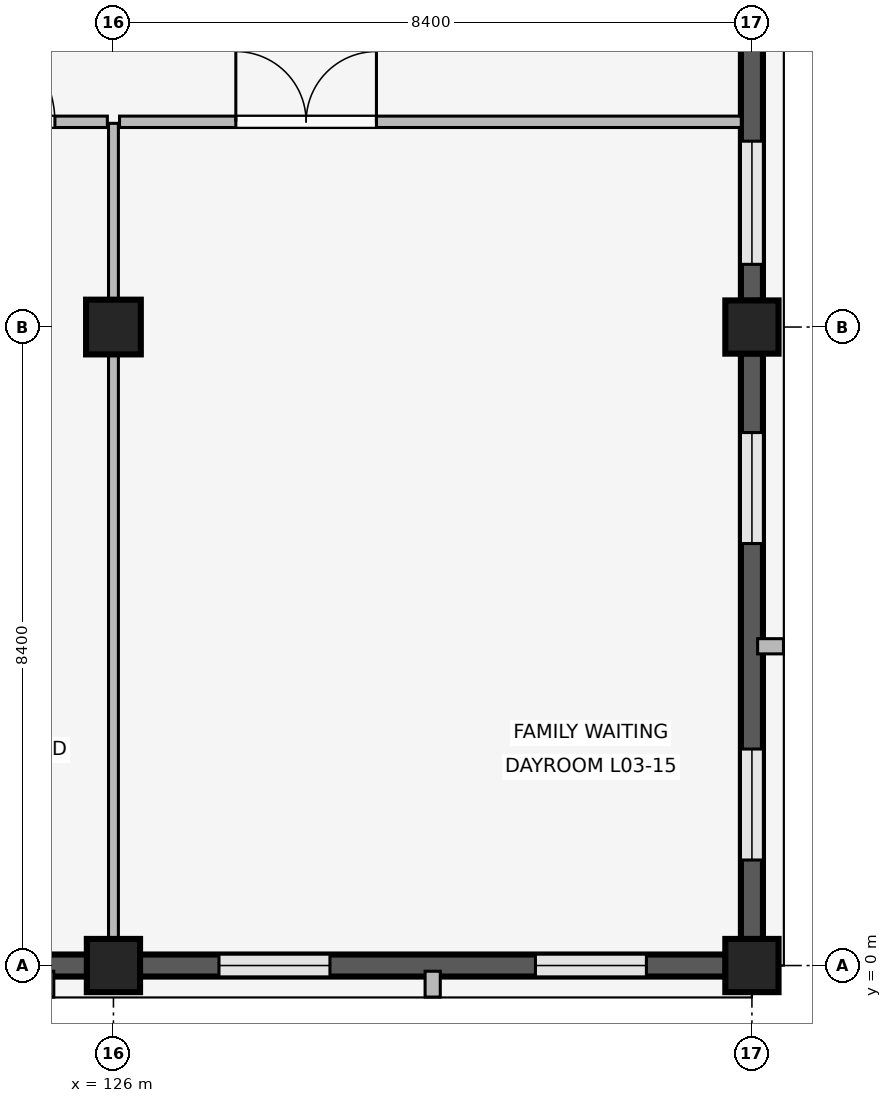
"""IFC4 building model, lengths in metres.
Left out: names, types, materials, properties, quantities, classifications, styles, units other than length and angle.
Written with IfcOpenShell. Run it as: python <this file> out.ifc"""

import sys

from ifc_helpers import new_model, si_unit, direction, frame, frame_2d, origin, origin_2d, place, context, subcontext, project, spatial, rectangle, extrude, element, fill, save


model = new_model("IFC4")
c1 = context("Model", 3, precision=1e-05, world=origin(), true_north=direction((0.0, 1.0)))
c2 = subcontext(c1, "Body", "Model", "MODEL_VIEW")
j1 = project(units=[si_unit("LENGTHUNIT", "METRE"), si_unit("PLANEANGLEUNIT", "RADIAN")], contexts=[c1])
p1 = place(None, origin())
s1 = spatial("IfcSite", under=j1, at=p1, CompositionType="ELEMENT")
p2 = place(p1, origin())
s2 = spatial("IfcBuilding", under=s1, at=p2, CompositionType="ELEMENT")
p3 = place(p2, frame((0.0, 0.0, 12.9)))
s3 = spatial("IfcBuildingStorey", under=s2, at=p3, CompositionType="ELEMENT", Elevation=12.9)
p4 = place(p3, frame((126.0, 0.0, 0.0), z_axis=(0.0, 0.0, 1.0), x_axis=(1.0, 0.0, 0.0)))
e1 = element("IfcColumn", 1, at=p4, inside=s3, PredefinedType="COLUMN", context=c2, shape_type="SweptSolid", body=[
    extrude(rectangle(XDim=0.7, YDim=0.7, at=origin_2d()), origin(), (0.0, 0.0, 1.0), 3.3),
])
p5 = place(p3, frame((126.0, 8.4, 0.0), z_axis=(0.0, 0.0, 1.0), x_axis=(1.0, 0.0, 0.0)))
e2 = element("IfcColumn", 2, at=p5, inside=s3, PredefinedType="COLUMN", context=c2, shape_type="SweptSolid", body=[
    extrude(rectangle(XDim=0.72, YDim=0.72, at=origin_2d()), origin(), (0.0, 0.0, 1.0), 3.3),
])
for number, where, z_axis, x_axis in (
    (3, (134.4, 0.0, 0.0), (0.0, 0.0, 1.0), (1.0, 0.0, 0.0)),
    (4, (134.4, 8.4, 0.0), (0.0, 0.0, 1.0), (1.0, 0.0, 0.0)),
):
    element("IfcColumn", number, at=place(p3, frame(where, z_axis=z_axis, x_axis=x_axis)), inside=s3, PredefinedType="COLUMN", context=c2, shape_type="SweptSolid", body=[
        extrude(rectangle(XDim=0.7, YDim=0.7, at=origin_2d()), origin(), (0.0, 0.0, 1.0), 3.3),
    ])
p6 = place(p3, frame((125.655, 0.0, 0.0), z_axis=(0.0, 0.0, 1.0), x_axis=(-1.0, 0.0, 0.0)))
e5 = element("IfcWall", 5, at=p6, inside=s3, PredefinedType="SOLIDWALL", context=c2, shape_type="SweptSolid", body=[
    extrude(rectangle(XDim=7.71, YDim=0.29, at=frame_2d((3.855, 0.0))), origin(), (0.0, 0.0, 1.0), 2.44),
])
p7 = place(p6, frame((0.963, 0.0, 0.85)))
e6 = element("IfcOpeningElement", 6, at=p7, cuts=e5, PredefinedType="OPENING", context=c2, shape_type="SweptSolid", body=[
    extrude(rectangle(XDim=1.62, YDim=0.95, at=frame_2d((0.81, 0.475))), frame((0.0, 0.155, 0.0), z_axis=(0.0, -1.0, 0.0), x_axis=(1.0, 0.0, 0.0)), (0.0, 0.0, 1.0), 0.31),
])
p8 = place(p6, frame((5.127, 0.0, 0.85)))
e7 = element("IfcOpeningElement", 7, at=p8, cuts=e5, PredefinedType="OPENING", context=c2, shape_type="SweptSolid", body=[
    extrude(rectangle(XDim=1.62, YDim=0.95, at=frame_2d((0.81, 0.475))), frame((0.0, 0.155, 0.0), z_axis=(0.0, -1.0, 0.0), x_axis=(1.0, 0.0, 0.0)), (0.0, 0.0, 1.0), 0.31),
])
p9 = place(p3, frame((125.115, -0.075, 0.0), z_axis=(0.0, 0.0, 1.0), x_axis=(0.0, -1.0, 0.0)))
e8 = element("IfcWall", 8, at=p9, inside=s3, PredefinedType="ELEMENTEDWALL", context=c2, shape_type="SweptSolid", body=[
    extrude(rectangle(XDim=0.34, YDim=0.2, at=frame_2d((0.17, 0.0))), origin(), (0.0, 0.0, 1.0), 2.42),
])
p10 = place(p3, frame((134.055, 0.0, 0.0), z_axis=(0.0, 0.0, 1.0), x_axis=(-1.0, 0.0, 0.0)))
e9 = element("IfcWall", 9, at=p10, inside=s3, PredefinedType="SOLIDWALL", context=c2, shape_type="SweptSolid", body=[
    extrude(rectangle(XDim=7.71, YDim=0.29, at=frame_2d((3.855, 0.0))), origin(), (0.0, 0.0, 1.0), 2.44),
])
p11 = place(p10, frame((1.043, 0.0, 0.85)))
e10 = element("IfcOpeningElement", 10, at=p11, cuts=e9, PredefinedType="OPENING", context=c2, shape_type="SweptSolid", body=[
    extrude(rectangle(XDim=1.46, YDim=0.85, at=frame_2d((0.73, 0.425))), frame((0.0, 0.155, 0.0), z_axis=(0.0, -1.0, 0.0), x_axis=(1.0, 0.0, 0.0)), (0.0, 0.0, 1.0), 0.31),
])
p12 = place(p10, frame((5.207, 0.0, 0.85)))
e11 = element("IfcOpeningElement", 11, at=p12, cuts=e9, PredefinedType="OPENING", context=c2, shape_type="SweptSolid", body=[
    extrude(rectangle(XDim=1.46, YDim=0.85, at=frame_2d((0.73, 0.425))), frame((0.0, 0.155, 0.0), z_axis=(0.0, -1.0, 0.0), x_axis=(1.0, 0.0, 0.0)), (0.0, 0.0, 1.0), 0.31),
])
p13 = place(p3, frame((130.2, -0.075, 0.0), z_axis=(0.0, 0.0, 1.0), x_axis=(0.0, -1.0, 0.0)))
e12 = element("IfcWall", 12, at=p13, inside=s3, PredefinedType="ELEMENTEDWALL", context=c2, shape_type="SweptSolid", body=[
    extrude(rectangle(XDim=0.34, YDim=0.2, at=frame_2d((0.17, 0.0))), origin(), (0.0, 0.0, 1.0), 2.42),
])
p14 = place(p3, frame((134.4, 8.055, 0.0), z_axis=(0.0, 0.0, 1.0), x_axis=(0.0, -1.0, 0.0)))
e13 = element("IfcWall", 13, at=p14, inside=s3, PredefinedType="SOLIDWALL", context=c2, shape_type="SweptSolid", body=[
    extrude(rectangle(XDim=7.71, YDim=0.29, at=frame_2d((3.855, 0.0))), origin(), (0.0, 0.0, 1.0), 2.44),
])
p15 = place(p14, frame((1.043, 0.0, 0.85)))
e14 = element("IfcOpeningElement", 14, at=p15, cuts=e13, PredefinedType="OPENING", context=c2, shape_type="SweptSolid", body=[
    extrude(rectangle(XDim=1.46, YDim=0.85, at=frame_2d((0.73, 0.425))), frame((0.0, 0.155, 0.0), z_axis=(0.0, -1.0, 0.0), x_axis=(1.0, 0.0, 0.0)), (0.0, 0.0, 1.0), 0.31),
])
p16 = place(p14, frame((5.207, 0.0, 0.85)))
e15 = element("IfcOpeningElement", 15, at=p16, cuts=e13, PredefinedType="OPENING", context=c2, shape_type="SweptSolid", body=[
    extrude(rectangle(XDim=1.46, YDim=0.85, at=frame_2d((0.73, 0.425))), frame((0.0, 0.155, 0.0), z_axis=(0.0, -1.0, 0.0), x_axis=(1.0, 0.0, 0.0)), (0.0, 0.0, 1.0), 0.31),
])
p17 = place(p3, frame((134.475, 4.2, 0.0), z_axis=(0.0, 0.0, 1.0), x_axis=(1.0, 0.0, 0.0)))
e16 = element("IfcWall", 16, at=p17, inside=s3, PredefinedType="ELEMENTEDWALL", context=c2, shape_type="SweptSolid", body=[
    extrude(rectangle(XDim=0.34, YDim=0.2, at=frame_2d((0.17, 0.0))), origin(), (0.0, 0.0, 1.0), 2.42),
])
p18 = place(p3, frame((134.4, 16.455, 0.0), z_axis=(0.0, 0.0, 1.0), x_axis=(0.0, -1.0, 0.0)))
e17 = element("IfcWall", 17, at=p18, inside=s3, PredefinedType="SOLIDWALL", context=c2, shape_type="SweptSolid", body=[
    extrude(rectangle(XDim=7.71, YDim=0.29, at=frame_2d((3.855, 0.0))), origin(), (0.0, 0.0, 1.0), 2.44),
])
p19 = place(p18, frame((0.48, 0.0, 0.85)))
e18 = element("IfcOpeningElement", 18, at=p19, cuts=e17, PredefinedType="OPENING", context=c2, shape_type="SweptSolid", body=[
    extrude(rectangle(XDim=1.62, YDim=0.95, at=frame_2d((0.81, 0.475))), frame((0.0, 0.155, 0.0), z_axis=(0.0, -1.0, 0.0), x_axis=(1.0, 0.0, 0.0)), (0.0, 0.0, 1.0), 0.31),
])
p20 = place(p18, frame((5.61, 0.0, 0.85)))
e19 = element("IfcOpeningElement", 19, at=p20, cuts=e17, PredefinedType="OPENING", context=c2, shape_type="SweptSolid", body=[
    extrude(rectangle(XDim=1.62, YDim=0.95, at=frame_2d((0.81, 0.475))), frame((0.0, 0.155, 0.0), z_axis=(0.0, -1.0, 0.0), x_axis=(1.0, 0.0, 0.0)), (0.0, 0.0, 1.0), 0.31),
])
p21 = place(p3, frame((117.68, 11.1, 0.0), z_axis=(0.0, 0.0, 1.0), x_axis=(1.0, 0.0, 0.0)))
e20 = element("IfcWall", 20, at=p21, inside=s3, PredefinedType="PARTITIONING", context=c2, shape_type="SweptSolid", body=[
    extrude(rectangle(XDim=8.24, YDim=0.15, at=frame_2d((4.12, 0.0))), origin(), (0.0, 0.0, 1.0), 2.42),
])
p22 = place(p21, frame((2.53, 0.0, 0.0)))
e21 = element("IfcOpeningElement", 21, at=p22, cuts=e20, PredefinedType="OPENING", context=c2, shape_type="SweptSolid", body=[
    extrude(rectangle(XDim=1.32, YDim=2.25, at=frame_2d((0.66, 1.125))), frame((0.0, 0.085, 0.0), z_axis=(0.0, -1.0, 0.0), x_axis=(1.0, 0.0, 0.0)), (0.0, 0.0, 1.0), 0.17),
])
p23 = place(p21, frame((6.23, 0.0, 0.0)))
e22 = element("IfcOpeningElement", 22, at=p23, cuts=e20, PredefinedType="OPENING", context=c2, shape_type="SweptSolid", body=[
    extrude(rectangle(XDim=1.32, YDim=2.25, at=frame_2d((0.66, 1.125))), frame((0.0, 0.085, 0.0), z_axis=(0.0, -1.0, 0.0), x_axis=(1.0, 0.0, 0.0)), (0.0, 0.0, 1.0), 0.17),
])
p24 = place(p3, frame((126.0, 0.14, 0.0), z_axis=(0.0, 0.0, 1.0), x_axis=(0.0, 1.0, 0.0)))
e23 = element("IfcWall", 23, at=p24, inside=s3, PredefinedType="PARTITIONING", context=c2, shape_type="SweptSolid", body=[
    extrude(rectangle(XDim=10.94, YDim=0.13, at=frame_2d((5.47, 0.0))), origin(), (0.0, 0.0, 1.0), 2.42),
])
p25 = place(p3, frame((126.08, 11.1, 0.0), z_axis=(0.0, 0.0, 1.0), x_axis=(1.0, 0.0, 0.0)))
e24 = element("IfcWall", 24, at=p25, inside=s3, PredefinedType="PARTITIONING", context=c2, shape_type="SweptSolid", body=[
    extrude(rectangle(XDim=8.18, YDim=0.15, at=frame_2d((4.09, 0.0))), origin(), (0.0, 0.0, 1.0), 2.42),
])
p26 = place(p25, frame((1.53, 0.0, 0.0)))
e25 = element("IfcOpeningElement", 25, at=p26, cuts=e24, PredefinedType="OPENING", context=c2, shape_type="SweptSolid", body=[
    extrude(rectangle(XDim=1.85, YDim=2.3, at=frame_2d((0.925, 1.15))), frame((0.0, 0.085, 0.0), z_axis=(0.0, -1.0, 0.0), x_axis=(1.0, 0.0, 0.0)), (0.0, 0.0, 1.0), 0.17),
])
p27 = place(p11, origin())
e26 = element("IfcWindow", 26, at=p27, inside=s3, PartitioningType="SINGLE_PANEL", PredefinedType="WINDOW", context=c2, shape_type="SweptSolid", body=[
    extrude(rectangle(XDim=1.46, YDim=0.85, at=frame_2d((0.73, 0.425))), frame((0.0, 0.03, 0.0), z_axis=(0.0, -1.0, 0.0), x_axis=(1.0, 0.0, 0.0)), (0.0, 0.0, 1.0), 0.06),
])
fill(e10, e26)
p28 = place(p12, origin())
e27 = element("IfcWindow", 27, at=p28, inside=s3, PartitioningType="SINGLE_PANEL", PredefinedType="WINDOW", context=c2, shape_type="SweptSolid", body=[
    extrude(rectangle(XDim=1.46, YDim=0.85, at=frame_2d((0.73, 0.425))), frame((0.0, 0.03, 0.0), z_axis=(0.0, -1.0, 0.0), x_axis=(1.0, 0.0, 0.0)), (0.0, 0.0, 1.0), 0.06),
])
fill(e11, e27)
p29 = place(p15, origin())
e28 = element("IfcWindow", 28, at=p29, inside=s3, PartitioningType="SINGLE_PANEL", PredefinedType="WINDOW", context=c2, shape_type="SweptSolid", body=[
    extrude(rectangle(XDim=1.46, YDim=0.85, at=frame_2d((0.73, 0.425))), frame((0.0, 0.03, 0.0), z_axis=(0.0, -1.0, 0.0), x_axis=(1.0, 0.0, 0.0)), (0.0, 0.0, 1.0), 0.06),
])
fill(e14, e28)
p30 = place(p16, origin())
e29 = element("IfcWindow", 29, at=p30, inside=s3, PartitioningType="SINGLE_PANEL", PredefinedType="WINDOW", context=c2, shape_type="SweptSolid", body=[
    extrude(rectangle(XDim=1.46, YDim=0.85, at=frame_2d((0.73, 0.425))), frame((0.0, 0.03, 0.0), z_axis=(0.0, -1.0, 0.0), x_axis=(1.0, 0.0, 0.0)), (0.0, 0.0, 1.0), 0.06),
])
fill(e15, e29)
p31 = place(p20, origin())
e30 = element("IfcWindow", 30, at=p31, inside=s3, PartitioningType="SINGLE_PANEL", PredefinedType="WINDOW", context=c2, shape_type="SweptSolid", body=[
    extrude(rectangle(XDim=1.62, YDim=0.95, at=frame_2d((0.81, 0.475))), frame((0.0, 0.03, 0.0), z_axis=(0.0, -1.0, 0.0), x_axis=(1.0, 0.0, 0.0)), (0.0, 0.0, 1.0), 0.06),
])
fill(e19, e30)
p32 = place(p23, origin())
e31 = element("IfcDoor", 31, at=p32, inside=s3, OperationType="SINGLE_SWING_LEFT", PredefinedType="DOOR", context=c2, shape_type="SweptSolid", body=[
    extrude(rectangle(XDim=1.32, YDim=2.25, at=frame_2d((0.66, 1.125))), frame((0.0, 0.025, 0.0), z_axis=(0.0, -1.0, 0.0), x_axis=(1.0, 0.0, 0.0)), (0.0, 0.0, 1.0), 0.05),
])
fill(e22, e31)
p33 = place(p26, origin())
e32 = element("IfcDoor", 32, at=p33, inside=s3, OperationType="DOUBLE_SWING_LEFT", PredefinedType="DOOR", context=c2, shape_type="SweptSolid", body=[
    extrude(rectangle(XDim=1.85, YDim=2.3, at=frame_2d((0.925, 1.15))), frame((0.0, 0.025, 0.0), z_axis=(0.0, -1.0, 0.0), x_axis=(1.0, 0.0, 0.0)), (0.0, 0.0, 1.0), 0.05),
])
fill(e25, e32)
save(model, sys.argv[1])
